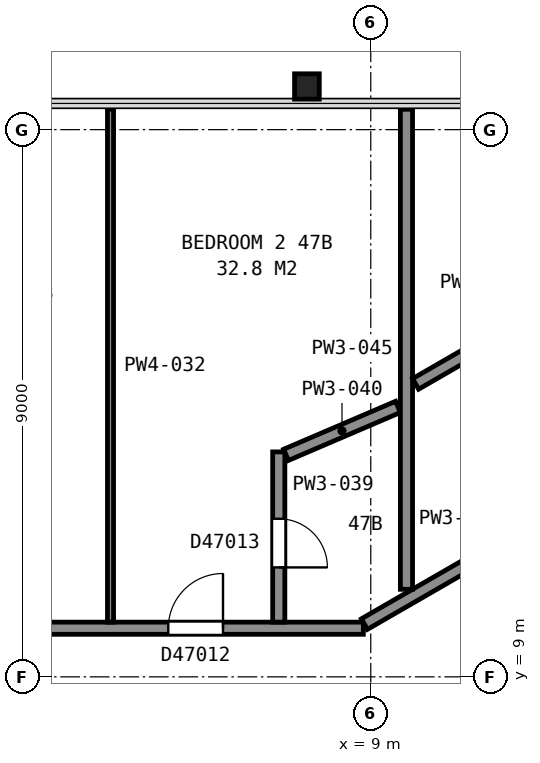
"""IFC4 building model, lengths in metres.
Left out: names, types, materials, properties, quantities, classifications, styles, units other than length and angle.
Written with IfcOpenShell. Run it as: python <this file> out.ifc"""

import sys

from ifc_helpers import new_model, si_unit, direction, frame, frame_2d, origin, origin_2d, place, context, subcontext, project, spatial, rectangle, i_section, extrude, element, fill, save


model = new_model("IFC4")
c1 = context("Model", 3, precision=1e-05, world=origin(), true_north=direction((0.0, 1.0)))
c2 = subcontext(c1, "Body", "Model", "MODEL_VIEW")
j1 = project(units=[si_unit("LENGTHUNIT", "METRE"), si_unit("PLANEANGLEUNIT", "RADIAN")], contexts=[c1])
p1 = place(None, origin())
s1 = spatial("IfcSite", under=j1, at=p1, CompositionType="ELEMENT")
p2 = place(p1, origin())
s2 = spatial("IfcBuilding", under=s1, at=p2, CompositionType="ELEMENT")
p3 = place(p2, frame((0.0, 0.0, 189.5)))
s3 = spatial("IfcBuildingStorey", under=s2, at=p3, CompositionType="ELEMENT", Elevation=189.5)
p4 = place(p3, frame((7.95, 18.71, 0.035), z_axis=(0.0, 0.0, 1.0), x_axis=(1.0, 0.0, 0.0)))
e1 = element("IfcColumn", 1, at=p4, inside=s3, PredefinedType="COLUMN", context=c2, shape_type="SweptSolid", body=[
    extrude(i_section(OverallWidth=0.406, OverallDepth=0.417, WebThickness=0.03, FlangeThickness=0.048, FilletRadius=0.015, at=origin_2d()), origin(), (0.0, 0.0, 1.0), 3.665),
])
p5 = place(p3, frame((6.178, 5.299, 0.0), z_axis=(0.0, 0.0, 1.0), x_axis=(0.866019993635, 0.500009370536, 0.0)))
e2 = element("IfcWall", 2, at=p5, inside=s3, PredefinedType="PARTITIONING", context=c2, shape_type="SweptSolid", body=[
    extrude(rectangle(XDim=9.6, YDim=0.2, at=frame_2d((4.8, 0.0))), origin(), (0.0, 0.0, 1.0), 3.45),
])
p6 = place(p3, frame((-8.828, 9.8, 0.0), z_axis=(0.0, 0.0, 1.0), x_axis=(1.0, 0.0, 0.0)))
e3 = element("IfcWall", 3, at=p6, inside=s3, PredefinedType="PARTITIONING", context=c2, shape_type="SweptSolid", body=[
    extrude(rectangle(XDim=17.706, YDim=0.2, at=frame_2d((8.853, 0.0))), origin(), (0.0, 0.0, 1.0), 2.713),
])
p7 = place(p6, frame((14.498, 0.0, 0.0)))
e4 = element("IfcOpeningElement", 4, at=p7, cuts=e3, PredefinedType="OPENING", context=c2, shape_type="SweptSolid", body=[
    extrude(rectangle(XDim=0.9, YDim=2.1, at=frame_2d((0.45, 1.05))), frame((0.0, 0.11, 0.0), z_axis=(0.0, -1.0, 0.0), x_axis=(1.0, 0.0, 0.0)), (0.0, 0.0, 1.0), 0.22),
])
p8 = place(p6, frame((10.919, 0.0, 0.0)))
e5 = element("IfcOpeningElement", 5, at=p8, cuts=e3, PredefinedType="OPENING", context=c2, shape_type="SweptSolid", body=[
    extrude(rectangle(XDim=0.9, YDim=2.1, at=frame_2d((0.45, 1.05))), frame((0.0, 0.11, 0.0), z_axis=(0.0, -1.0, 0.0), x_axis=(1.0, 0.0, 0.0)), (0.0, 0.0, 1.0), 0.22),
])
p9 = place(p6, frame((6.113, 0.0, 0.0)))
e6 = element("IfcOpeningElement", 6, at=p9, cuts=e3, PredefinedType="OPENING", context=c2, shape_type="SweptSolid", body=[
    extrude(rectangle(XDim=0.9, YDim=2.1, at=frame_2d((0.45, 1.05))), frame((0.0, 0.11, 0.0), z_axis=(0.0, -1.0, 0.0), x_axis=(1.0, 0.0, 0.0)), (0.0, 0.0, 1.0), 0.22),
])
p10 = place(p3, frame((4.72, 9.9, 0.0), z_axis=(0.0, 0.0, 1.0), x_axis=(0.0, 1.0, 0.0)))
e7 = element("IfcWall", 7, at=p10, inside=s3, PredefinedType="PARTITIONING", context=c2, shape_type="SweptSolid", body=[
    extrude(rectangle(XDim=8.435, YDim=0.1, at=frame_2d((4.218, 0.0))), origin(), (0.0, 0.0, 1.0), 2.713),
])
p11 = place(p3, frame((7.487, 12.7, 0.0), z_axis=(0.0, 0.0, 1.0), x_axis=(0.0, -1.0, 0.0)))
e8 = element("IfcWall", 8, at=p11, inside=s3, PredefinedType="PARTITIONING", context=c2, shape_type="SweptSolid", body=[
    extrude(rectangle(XDim=2.8, YDim=0.2, at=frame_2d((1.4, 0.0))), origin(), (0.0, 0.0, 1.0), 2.713),
])
p12 = place(p11, frame((1.1, 0.0, 0.0)))
e9 = element("IfcOpeningElement", 9, at=p12, cuts=e8, PredefinedType="OPENING", context=c2, shape_type="SweptSolid", body=[
    extrude(rectangle(XDim=0.8, YDim=2.1, at=frame_2d((0.4, 1.05))), frame((0.0, 0.11, 0.0), z_axis=(0.0, -1.0, 0.0), x_axis=(1.0, 0.0, 0.0)), (0.0, 0.0, 1.0), 0.22),
])
p13 = place(p3, frame((7.606, 12.651, 0.0), z_axis=(0.0, 0.0, 1.0), x_axis=(0.919138725477, 0.39393400885, 0.0)))
e10 = element("IfcWall", 10, at=p13, inside=s3, PredefinedType="PARTITIONING", context=c2, shape_type="SweptSolid", body=[
    extrude(rectangle(XDim=2.003, YDim=0.2, at=frame_2d((1.001, 0.0))), origin(), (0.0, 0.0, 1.0), 2.713),
])
p14 = place(p3, frame((8.895, 9.867, 0.0), z_axis=(0.0, 0.0, 1.0), x_axis=(0.866079355551, 0.499906541154, 0.0)))
e11 = element("IfcWall", 11, at=p14, inside=s3, PredefinedType="PARTITIONING", context=c2, shape_type="SweptSolid", body=[
    extrude(rectangle(XDim=8.113, YDim=0.2, at=frame_2d((4.056, 0.0))), origin(), (0.0, 0.0, 1.0), 2.713),
])
p15 = place(p14, frame((5.201, 0.0, 0.0)))
e12 = element("IfcOpeningElement", 12, at=p15, cuts=e11, PredefinedType="OPENING", context=c2, shape_type="SweptSolid", body=[
    extrude(rectangle(XDim=0.9, YDim=2.1, at=frame_2d((0.45, 1.05))), frame((0.0, 0.11, 0.0), z_axis=(0.0, -1.0, 0.0), x_axis=(1.0, 0.0, 0.0)), (0.0, 0.0, 1.0), 0.22),
])
p16 = place(p3, frame((9.587, 10.44, 0.0), z_axis=(0.0, 0.0, 1.0), x_axis=(0.0, 1.0, 0.0)))
e13 = element("IfcWall", 13, at=p16, inside=s3, PredefinedType="PARTITIONING", context=c2, shape_type="SweptSolid", body=[
    extrude(rectangle(XDim=7.895, YDim=0.2, at=frame_2d((3.947, 0.0))), origin(), (0.0, 0.0, 1.0), 2.713),
])
p17 = place(p3, frame((12.04, 15.146, 0.0), z_axis=(0.0, 0.0, 1.0), x_axis=(-0.866206990114, -0.499685351273, 0.0)))
e14 = element("IfcWall", 14, at=p17, inside=s3, PredefinedType="PARTITIONING", context=c2, shape_type="SweptSolid", body=[
    extrude(rectangle(XDim=2.658, YDim=0.2, at=frame_2d((1.329, 0.0))), origin(), (0.0, 0.0, 1.0), 2.713),
])
p18 = place(p17, frame((0.932, 0.0, 0.0)))
e15 = element("IfcOpeningElement", 15, at=p18, cuts=e14, PredefinedType="OPENING", context=c2, shape_type="SweptSolid", body=[
    extrude(rectangle(XDim=0.8, YDim=2.1, at=frame_2d((0.4, 1.05))), frame((0.0, 0.11, 0.0), z_axis=(0.0, -1.0, 0.0), x_axis=(1.0, 0.0, 0.0)), (0.0, 0.0, 1.0), 0.22),
])
p19 = place(p7, origin())
e16 = element("IfcDoor", 16, at=p19, inside=s3, OperationType="SINGLE_SWING_RIGHT", PredefinedType="DOOR", context=c2, shape_type="SweptSolid", body=[
    extrude(rectangle(XDim=0.9, YDim=2.1, at=frame_2d((0.45, 1.05))), frame((0.0, 0.025, 0.0), z_axis=(0.0, -1.0, 0.0), x_axis=(1.0, 0.0, 0.0)), (0.0, 0.0, 1.0), 0.05),
])
fill(e4, e16)
p20 = place(p12, origin())
e17 = element("IfcDoor", 17, at=p20, inside=s3, OperationType="SINGLE_SWING_RIGHT", PredefinedType="DOOR", context=c2, shape_type="SweptSolid", body=[
    extrude(rectangle(XDim=0.8, YDim=2.1, at=frame_2d((0.4, 1.05))), frame((0.0, 0.025, 0.0), z_axis=(0.0, -1.0, 0.0), x_axis=(1.0, 0.0, 0.0)), (0.0, 0.0, 1.0), 0.05),
])
fill(e9, e17)
save(model, sys.argv[1])
